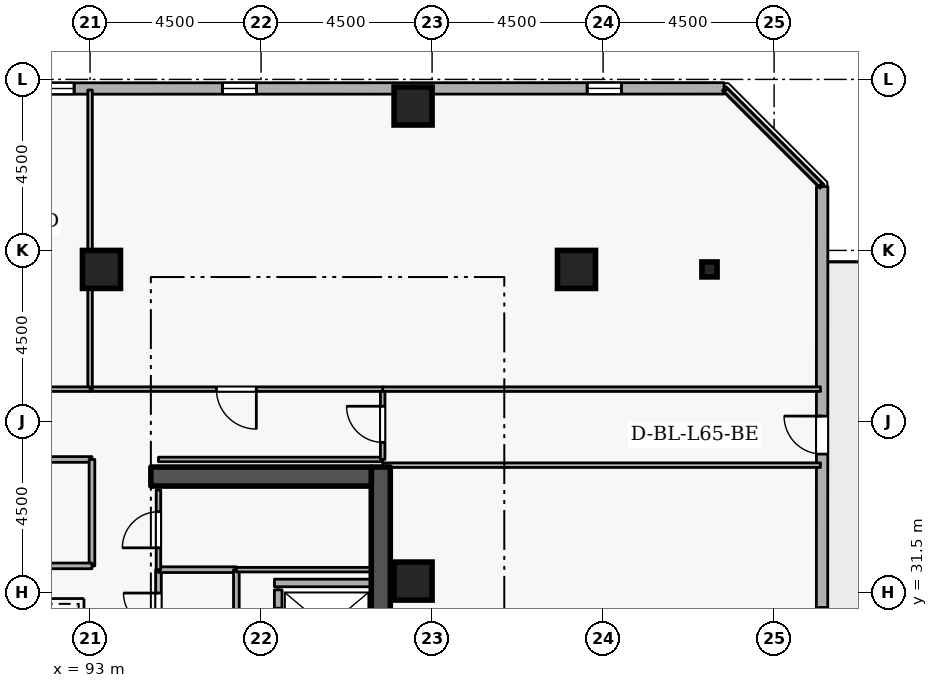
"""IFC4 building model, lengths in metres.
Left out: names, types, materials, properties, quantities, classifications, styles, units other than length and angle.
Written with IfcOpenShell. Run it as: python <this file> out.ifc"""

import sys

from ifc_helpers import new_model, si_unit, direction, frame, frame_2d, origin, origin_2d, place, context, subcontext, project, spatial, rectangle, i_section, extrude, element, fill, save


model = new_model("IFC4")
c1 = context("Model", 3, precision=1e-05, world=origin(), true_north=direction((0.0, 1.0)))
c2 = subcontext(c1, "Body", "Model", "MODEL_VIEW")
j1 = project(units=[si_unit("LENGTHUNIT", "METRE"), si_unit("PLANEANGLEUNIT", "RADIAN")], contexts=[c1])
p1 = place(None, origin())
s1 = spatial("IfcSite", under=j1, at=p1, CompositionType="ELEMENT")
p2 = place(p1, origin())
s2 = spatial("IfcBuilding", under=s1, at=p2, CompositionType="ELEMENT")
p3 = place(p2, frame((0.0, 0.0, 243.9)))
s3 = spatial("IfcBuildingStorey", under=s2, at=p3, CompositionType="ELEMENT", Elevation=243.9)
p4 = place(p3, frame((100.65, 19.2, 0.0), z_axis=(0.0, 0.0, 1.0), x_axis=(0.0, 1.0, 0.0)))
e1 = element("IfcWall", 1, at=p4, inside=s3, PredefinedType="SHEAR", context=c2, shape_type="SweptSolid", body=[
    extrude(rectangle(XDim=15.6, YDim=0.5, at=frame_2d((7.8, 0.0))), origin(), (0.0, 0.0, 1.0), 3.6),
])
p5 = place(p3, frame((94.6, 34.55, 0.0), z_axis=(0.0, 0.0, 1.0), x_axis=(1.0, 0.0, 0.0)))
e2 = element("IfcWall", 2, at=p5, inside=s3, PredefinedType="SHEAR", context=c2, shape_type="SweptSolid", body=[
    extrude(rectangle(XDim=5.8, YDim=0.5, at=frame_2d((2.9, 0.0))), origin(), (0.0, 0.0, 1.0), 3.6),
])
for number, where, z_axis, x_axis in (
    (3, (105.8, 40.0, 0.0), (0.0, 0.0, 1.0), (1.0, 0.0, 0.0)),
    (4, (101.5, 44.3, 0.0), (0.0, 0.0, 1.0), (1.0, 0.0, 0.0)),
    (5, (93.3, 40.0, 0.0), (0.0, 0.0, 1.0), (1.0, 0.0, 0.0)),
    (6, (101.5, 31.8, 0.0), (0.0, 0.0, 1.0), (1.0, 0.0, 0.0)),
):
    element("IfcColumn", number, at=place(p3, frame(where, z_axis=z_axis, x_axis=x_axis)), inside=s3, PredefinedType="COLUMN", context=c2, shape_type="SweptSolid", body=[
        extrude(rectangle(XDim=1.0, YDim=1.0, at=origin_2d()), origin(), (0.0, 0.0, 1.0), 3.6),
    ])
p6 = place(p3, frame((109.3, 40.0, 0.0), z_axis=(0.0, 0.0, 1.0), x_axis=(1.0, 0.0, 0.0)))
e7 = element("IfcColumn", 7, at=p6, inside=s3, PredefinedType="COLUMN", context=c2, shape_type="SweptSolid", body=[
    extrude(i_section(OverallWidth=0.399, OverallDepth=0.394, WebThickness=0.023, FlangeThickness=0.037, FilletRadius=0.015, at=origin_2d()), origin(), (0.0, 0.0, 1.0), 3.6),
])
p7 = place(p3, frame((112.256, 8.301, 0.0), z_axis=(0.0, 0.0, 1.0), x_axis=(0.000244999128, 0.999999969988, 0.0)))
e8 = element("IfcWall", 8, at=p7, inside=s3, PredefinedType="STANDARD", context=c2, shape_type="SweptSolid", body=[
    extrude(rectangle(XDim=33.881, YDim=0.3, at=frame_2d((16.94, 0.0))), origin(), (0.0, 0.0, 1.0), 2.7),
])
p8 = place(p7, frame((26.84, 0.0, 0.0)))
e9 = element("IfcOpeningElement", 9, at=p8, cuts=e8, PredefinedType="OPENING", context=c2, shape_type="SweptSolid", body=[
    extrude(rectangle(XDim=1.0, YDim=2.08, at=frame_2d((0.5, 1.04))), frame((0.0, 0.16, 0.0), z_axis=(0.0, -1.0, 0.0), x_axis=(1.0, 0.0, 0.0)), (0.0, 0.0, 1.0), 0.32),
])
p9 = place(p7, frame((2.7, 0.0, 0.72)))
e10 = element("IfcOpeningElement", 10, at=p9, cuts=e8, PredefinedType="OPENING", context=c2, shape_type="SweptSolid", body=[
    extrude(rectangle(XDim=0.9, YDim=1.75, at=frame_2d((0.45, 0.875))), frame((0.0, 0.16, 0.0), z_axis=(0.0, -1.0, 0.0), x_axis=(1.0, 0.0, 0.0)), (0.0, 0.0, 1.0), 0.32),
])
p10 = place(p7, frame((12.3, 0.0, 0.72)))
e11 = element("IfcOpeningElement", 11, at=p10, cuts=e8, PredefinedType="OPENING", context=c2, shape_type="SweptSolid", body=[
    extrude(rectangle(XDim=0.9, YDim=1.75, at=frame_2d((0.45, 0.875))), frame((0.0, 0.16, 0.0), z_axis=(0.0, -1.0, 0.0), x_axis=(1.0, 0.0, 0.0)), (0.0, 0.0, 1.0), 0.32),
])
p11 = place(p7, frame((17.1, 0.0, 0.72)))
e12 = element("IfcOpeningElement", 12, at=p11, cuts=e8, PredefinedType="OPENING", context=c2, shape_type="SweptSolid", body=[
    extrude(rectangle(XDim=0.9, YDim=1.75, at=frame_2d((0.45, 0.875))), frame((0.0, 0.16, 0.0), z_axis=(0.0, -1.0, 0.0), x_axis=(1.0, 0.0, 0.0)), (0.0, 0.0, 1.0), 0.32),
])
p12 = place(p7, frame((21.9, 0.0, 0.72)))
e13 = element("IfcOpeningElement", 13, at=p12, cuts=e8, PredefinedType="OPENING", context=c2, shape_type="SweptSolid", body=[
    extrude(rectangle(XDim=0.9, YDim=1.75, at=frame_2d((0.45, 0.875))), frame((0.0, 0.16, 0.0), z_axis=(0.0, -1.0, 0.0), x_axis=(1.0, 0.0, 0.0)), (0.0, 0.0, 1.0), 0.32),
])
p13 = place(p3, frame((109.681, 44.765, 0.0), z_axis=(0.0, 0.0, 1.0), x_axis=(-0.999999969988, -0.000244999128, 0.0)))
e14 = element("IfcWall", 14, at=p13, inside=s3, PredefinedType="STANDARD", context=c2, shape_type="SweptSolid", body=[
    extrude(rectangle(XDim=33.881, YDim=0.3, at=frame_2d((16.94, 0.0))), origin(), (0.0, 0.0, 1.0), 2.7),
])
p14 = place(p13, frame((2.7, 0.0, 0.72)))
e15 = element("IfcOpeningElement", 15, at=p14, cuts=e14, PredefinedType="OPENING", context=c2, shape_type="SweptSolid", body=[
    extrude(rectangle(XDim=0.9, YDim=1.75, at=frame_2d((0.45, 0.875))), frame((0.0, 0.16, 0.0), z_axis=(0.0, -1.0, 0.0), x_axis=(1.0, 0.0, 0.0)), (0.0, 0.0, 1.0), 0.32),
])
p15 = place(p13, frame((12.3, 0.0, 0.72)))
e16 = element("IfcOpeningElement", 16, at=p15, cuts=e14, PredefinedType="OPENING", context=c2, shape_type="SweptSolid", body=[
    extrude(rectangle(XDim=0.9, YDim=1.75, at=frame_2d((0.45, 0.875))), frame((0.0, 0.16, 0.0), z_axis=(0.0, -1.0, 0.0), x_axis=(1.0, 0.0, 0.0)), (0.0, 0.0, 1.0), 0.32),
])
p16 = place(p13, frame((17.1, 0.0, 0.72)))
e17 = element("IfcOpeningElement", 17, at=p16, cuts=e14, PredefinedType="OPENING", context=c2, shape_type="SweptSolid", body=[
    extrude(rectangle(XDim=0.9, YDim=1.75, at=frame_2d((0.45, 0.875))), frame((0.0, 0.16, 0.0), z_axis=(0.0, -1.0, 0.0), x_axis=(1.0, 0.0, 0.0)), (0.0, 0.0, 1.0), 0.32),
])
p17 = place(p13, frame((26.7, 0.0, 0.72)))
e18 = element("IfcOpeningElement", 18, at=p17, cuts=e14, PredefinedType="OPENING", context=c2, shape_type="SweptSolid", body=[
    extrude(rectangle(XDim=0.9, YDim=1.75, at=frame_2d((0.45, 0.875))), frame((0.0, 0.16, 0.0), z_axis=(0.0, -1.0, 0.0), x_axis=(1.0, 0.0, 0.0)), (0.0, 0.0, 1.0), 0.32),
])
p18 = place(p3, frame((97.95, 31.57, 0.0), z_axis=(0.0, 0.0, 1.0), x_axis=(0.0, -1.0, 0.0)))
e19 = element("IfcWall", 19, at=p18, inside=s3, PredefinedType="STANDARD", context=c2, shape_type="SweptSolid", body=[
    extrude(rectangle(XDim=1.99, YDim=0.2, at=frame_2d((0.995, 0.0))), origin(), (0.0, 0.0, 1.0), 3.34),
])
p19 = place(p18, frame((0.485, 0.0, 0.0)))
e20 = element("IfcOpeningElement", 20, at=p19, cuts=e19, PredefinedType="OPENING", context=c2, shape_type="SweptSolid", body=[
    extrude(rectangle(XDim=1.02, YDim=2.06, at=frame_2d((0.51, 1.03))), frame((0.0, 0.11, 0.0), z_axis=(0.0, -1.0, 0.0), x_axis=(1.0, 0.0, 0.0)), (0.0, 0.0, 1.0), 0.22),
])
p20 = place(p3, frame((97.852, 31.75, 0.0), z_axis=(0.0, 0.0, 1.0), x_axis=(1.0, 0.0, 0.0)))
e21 = element("IfcWall", 21, at=p20, inside=s3, PredefinedType="STANDARD", context=c2, shape_type="SweptSolid", body=[
    extrude(rectangle(XDim=2.536, YDim=0.2, at=frame_2d((1.268, 0.0))), origin(), (0.0, 0.0, 1.0), 3.34),
])
p21 = place(p3, frame((94.8, 29.95, 0.0), z_axis=(0.0, 0.0, 1.0), x_axis=(0.0, 1.0, 0.0)))
e22 = element("IfcWall", 22, at=p21, inside=s3, PredefinedType="PARTITIONING", context=c2, shape_type="SweptSolid", body=[
    extrude(rectangle(XDim=2.15, YDim=0.15, at=frame_2d((1.075, 0.0))), origin(), (0.0, 0.0, 1.0), 3.34),
])
p22 = place(p21, frame((0.615, 0.0, 0.0)))
e23 = element("IfcOpeningElement", 23, at=p22, cuts=e22, PredefinedType="OPENING", context=c2, shape_type="SweptSolid", body=[
    extrude(rectangle(XDim=0.92, YDim=2.08, at=frame_2d((0.46, 1.04))), frame((0.0, 0.085, 0.0), z_axis=(0.0, -1.0, 0.0), x_axis=(1.0, 0.0, 0.0)), (0.0, 0.0, 1.0), 0.17),
])
p23 = place(p3, frame((94.8, 32.1, 0.0), z_axis=(0.0, 0.0, 1.0), x_axis=(1.0, 0.0, 0.0)))
e24 = element("IfcWall", 24, at=p23, inside=s3, PredefinedType="PARTITIONING", context=c2, shape_type="SweptSolid", body=[
    extrude(rectangle(XDim=2.05, YDim=0.15, at=frame_2d((1.025, 0.0))), origin(), (0.0, 0.0, 1.0), 3.34),
])
p24 = place(p3, frame((96.85, 32.1, 0.0), z_axis=(0.0, 0.0, 1.0), x_axis=(0.0, -1.0, 0.0)))
e25 = element("IfcWall", 25, at=p24, inside=s3, PredefinedType="PARTITIONING", context=c2, shape_type="SweptSolid", body=[
    extrude(rectangle(XDim=2.15, YDim=0.15, at=frame_2d((1.075, 0.0))), origin(), (0.0, 0.0, 1.0), 3.34),
])
p25 = place(p3, frame((94.8, 32.1, 0.0), z_axis=(0.0, 0.0, 1.0), x_axis=(0.0, 1.0, 0.0)))
e26 = element("IfcWall", 26, at=p25, inside=s3, PredefinedType="PARTITIONING", context=c2, shape_type="SweptSolid", body=[
    extrude(rectangle(XDim=2.1, YDim=0.12, at=frame_2d((1.05, 0.0))), origin(), (0.0, 0.0, 1.0), 3.34),
])
p26 = place(p25, frame((0.575, 0.0, 0.0)))
e27 = element("IfcOpeningElement", 27, at=p26, cuts=e26, PredefinedType="OPENING", context=c2, shape_type="SweptSolid", body=[
    extrude(rectangle(XDim=0.95, YDim=2.1, at=frame_2d((0.475, 1.05))), frame((0.0, 0.07, 0.0), z_axis=(0.0, -1.0, 0.0), x_axis=(1.0, 0.0, 0.0)), (0.0, 0.0, 1.0), 0.14),
])
p27 = place(p3, frame((100.4, 32.1, 0.0), z_axis=(0.0, 0.0, 1.0), x_axis=(-1.0, 0.0, 0.0)))
e28 = element("IfcWall", 28, at=p27, inside=s3, PredefinedType="PARTITIONING", context=c2, shape_type="SweptSolid", body=[
    extrude(rectangle(XDim=3.55, YDim=0.12, at=frame_2d((1.775, 0.0))), origin(), (0.0, 0.0, 1.0), 3.34),
])
p28 = place(p3, frame((94.8, 35.0, 0.0), z_axis=(0.0, 0.0, 1.0), x_axis=(1.0, 0.0, 0.0)))
e29 = element("IfcWall", 29, at=p28, inside=s3, PredefinedType="PARTITIONING", context=c2, shape_type="SweptSolid", body=[
    extrude(rectangle(XDim=5.9, YDim=0.12, at=frame_2d((2.95, 0.0))), origin(), (0.0, 0.0, 1.0), 3.34),
])
p29 = place(p3, frame((100.7, 35.0, 0.0), z_axis=(0.0, 0.0, 1.0), x_axis=(0.0, 1.0, 0.0)))
e30 = element("IfcWall", 30, at=p29, inside=s3, PredefinedType="PARTITIONING", context=c2, shape_type="SweptSolid", body=[
    extrude(rectangle(XDim=1.85, YDim=0.12, at=frame_2d((0.925, 0.0))), origin(), (0.0, 0.0, 1.0), 3.34),
])
p30 = place(p29, frame((0.45, 0.0, 0.0)))
e31 = element("IfcOpeningElement", 31, at=p30, cuts=e30, PredefinedType="OPENING", context=c2, shape_type="SweptSolid", body=[
    extrude(rectangle(XDim=0.95, YDim=2.1, at=frame_2d((0.475, 1.05))), frame((0.0, 0.07, 0.0), z_axis=(0.0, -1.0, 0.0), x_axis=(1.0, 0.0, 0.0)), (0.0, 0.0, 1.0), 0.14),
])
for number, where, z_axis, x_axis in (
    (32, (100.7, 36.85, 0.0), (0.0, 0.0, 1.0), (1.0, 0.0, 0.0)),
    (33, (112.22, 34.85, 0.0), (0.0, 0.0, 1.0), (-1.0, 0.0, 0.0)),
):
    element("IfcWall", number, at=place(p3, frame(where, z_axis=z_axis, x_axis=x_axis)), inside=s3, PredefinedType="PARTITIONING", context=c2, shape_type="SweptSolid", body=[
        extrude(rectangle(XDim=11.52, YDim=0.12, at=frame_2d((5.76, 0.0))), origin(), (0.0, 0.0, 1.0), 3.34),
    ])
p31 = place(p3, frame((100.7, 36.85, 0.0), z_axis=(0.0, 0.0, 1.0), x_axis=(-1.0, 0.0, 0.0)))
e34 = element("IfcWall", 34, at=p31, inside=s3, PredefinedType="PARTITIONING", context=c2, shape_type="SweptSolid", body=[
    extrude(rectangle(XDim=7.7, YDim=0.12, at=frame_2d((3.85, 0.0))), origin(), (0.0, 0.0, 1.0), 3.34),
])
p32 = place(p31, frame((3.325, 0.0, 0.0)))
e35 = element("IfcOpeningElement", 35, at=p32, cuts=e34, PredefinedType="OPENING", context=c2, shape_type="SweptSolid", body=[
    extrude(rectangle(XDim=1.05, YDim=2.1, at=frame_2d((0.525, 1.05))), frame((0.0, 0.07, 0.0), z_axis=(0.0, -1.0, 0.0), x_axis=(1.0, 0.0, 0.0)), (0.0, 0.0, 1.0), 0.14),
])
p33 = place(p3, frame((93.0, 36.85, 0.0), z_axis=(0.0, 0.0, 1.0), x_axis=(0.0, 1.0, 0.0)))
e36 = element("IfcWall", 36, at=p33, inside=s3, PredefinedType="PARTITIONING", context=c2, shape_type="SweptSolid", body=[
    extrude(rectangle(XDim=7.87, YDim=0.12, at=frame_2d((3.935, 0.0))), origin(), (0.0, 0.0, 1.0), 3.34),
])
p34 = place(p3, frame((109.725, 44.72, 0.0), z_axis=(0.0, 0.0, 1.0), x_axis=(0.707106781187, -0.707106781187, 0.0)))
e37 = element("IfcWall", 37, at=p34, inside=s3, PredefinedType="PARTITIONING", context=c2, shape_type="SweptSolid", body=[
    extrude(rectangle(XDim=3.528, YDim=0.12, at=frame_2d((1.764, 0.0))), origin(), (0.0, 0.0, 1.0), 3.34),
])
p35 = place(p3, frame((93.0, 36.85, 0.0), z_axis=(0.0, 0.0, 1.0), x_axis=(-1.0, 0.0, 0.0)))
e38 = element("IfcWall", 38, at=p35, inside=s3, PredefinedType="PARTITIONING", context=c2, shape_type="SweptSolid", body=[
    extrude(rectangle(XDim=6.3, YDim=0.12, at=frame_2d((3.15, 0.0))), origin(), (0.0, 0.0, 1.0), 3.34),
])
p36 = place(p35, frame((2.675, 0.0, 0.0)))
e39 = element("IfcOpeningElement", 39, at=p36, cuts=e38, PredefinedType="OPENING", context=c2, shape_type="SweptSolid", body=[
    extrude(rectangle(XDim=0.95, YDim=2.1, at=frame_2d((0.475, 1.05))), frame((0.0, 0.07, 0.0), z_axis=(0.0, -1.0, 0.0), x_axis=(1.0, 0.0, 0.0)), (0.0, 0.0, 1.0), 0.14),
])
p37 = place(p3, frame((88.5, 35.0, 0.0), z_axis=(0.0, 0.0, 1.0), x_axis=(1.0, 0.0, 0.0)))
e40 = element("IfcWall", 40, at=p37, inside=s3, PredefinedType="PARTITIONING", context=c2, shape_type="SweptSolid", body=[
    extrude(rectangle(XDim=4.55, YDim=0.15, at=frame_2d((2.275, 0.0))), origin(), (0.0, 0.0, 1.0), 3.34),
])
p38 = place(p37, frame((1.625, 0.0, 0.0)))
e41 = element("IfcOpeningElement", 41, at=p38, cuts=e40, PredefinedType="OPENING", context=c2, shape_type="SweptSolid", body=[
    extrude(rectangle(XDim=1.3, YDim=2.12, at=frame_2d((0.65, 1.06))), frame((0.0, 0.085, 0.0), z_axis=(0.0, -1.0, 0.0), x_axis=(1.0, 0.0, 0.0)), (0.0, 0.0, 1.0), 0.17),
])
p39 = place(p3, frame((93.05, 35.0, 0.0), z_axis=(0.0, 0.0, 1.0), x_axis=(0.0, -1.0, 0.0)))
e42 = element("IfcWall", 42, at=p39, inside=s3, PredefinedType="PARTITIONING", context=c2, shape_type="SweptSolid", body=[
    extrude(rectangle(XDim=2.8, YDim=0.15, at=frame_2d((1.4, 0.0))), origin(), (0.0, 0.0, 1.0), 3.34),
])
p40 = place(p3, frame((93.05, 32.2, 0.0), z_axis=(0.0, 0.0, 1.0), x_axis=(-1.0, 0.0, 0.0)))
e43 = element("IfcWall", 43, at=p40, inside=s3, PredefinedType="PARTITIONING", context=c2, shape_type="SweptSolid", body=[
    extrude(rectangle(XDim=4.55, YDim=0.15, at=frame_2d((2.275, 0.0))), origin(), (0.0, 0.0, 1.0), 3.34),
])
p41 = place(p8, origin())
e44 = element("IfcDoor", 44, at=p41, inside=s3, OperationType="SINGLE_SWING_RIGHT", PredefinedType="DOOR", context=c2, shape_type="SweptSolid", body=[
    extrude(rectangle(XDim=1.0, YDim=2.08, at=frame_2d((0.5, 1.04))), frame((0.0, 0.025, 0.0), z_axis=(0.0, -1.0, 0.0), x_axis=(1.0, 0.0, 0.0)), (0.0, 0.0, 1.0), 0.05),
])
fill(e9, e44)
p42 = place(p12, origin())
e45 = element("IfcWindow", 45, at=p42, inside=s3, PartitioningType="SINGLE_PANEL", PredefinedType="WINDOW", context=c2, shape_type="SweptSolid", body=[
    extrude(rectangle(XDim=0.9, YDim=1.75, at=frame_2d((0.45, 0.875))), frame((0.0, 0.03, 0.0), z_axis=(0.0, -1.0, 0.0), x_axis=(1.0, 0.0, 0.0)), (0.0, 0.0, 1.0), 0.06),
])
fill(e13, e45)
p43 = place(p14, origin())
e46 = element("IfcWindow", 46, at=p43, inside=s3, PartitioningType="SINGLE_PANEL", PredefinedType="WINDOW", context=c2, shape_type="SweptSolid", body=[
    extrude(rectangle(XDim=0.9, YDim=1.75, at=frame_2d((0.45, 0.875))), frame((0.0, 0.03, 0.0), z_axis=(0.0, -1.0, 0.0), x_axis=(1.0, 0.0, 0.0)), (0.0, 0.0, 1.0), 0.06),
])
fill(e15, e46)
p44 = place(p15, origin())
e47 = element("IfcWindow", 47, at=p44, inside=s3, PartitioningType="SINGLE_PANEL", PredefinedType="WINDOW", context=c2, shape_type="SweptSolid", body=[
    extrude(rectangle(XDim=0.9, YDim=1.75, at=frame_2d((0.45, 0.875))), frame((0.0, 0.03, 0.0), z_axis=(0.0, -1.0, 0.0), x_axis=(1.0, 0.0, 0.0)), (0.0, 0.0, 1.0), 0.06),
])
fill(e16, e47)
p45 = place(p16, origin())
e48 = element("IfcWindow", 48, at=p45, inside=s3, PartitioningType="SINGLE_PANEL", PredefinedType="WINDOW", context=c2, shape_type="SweptSolid", body=[
    extrude(rectangle(XDim=0.9, YDim=1.75, at=frame_2d((0.45, 0.875))), frame((0.0, 0.03, 0.0), z_axis=(0.0, -1.0, 0.0), x_axis=(1.0, 0.0, 0.0)), (0.0, 0.0, 1.0), 0.06),
])
fill(e17, e48)
p46 = place(p22, origin())
e49 = element("IfcDoor", 49, at=p46, inside=s3, OperationType="SINGLE_SWING_RIGHT", PredefinedType="DOOR", context=c2, shape_type="SweptSolid", body=[
    extrude(rectangle(XDim=0.92, YDim=2.08, at=frame_2d((0.46, 1.04))), frame((0.0, 0.025, 0.0), z_axis=(0.0, -1.0, 0.0), x_axis=(1.0, 0.0, 0.0)), (0.0, 0.0, 1.0), 0.05),
])
fill(e23, e49)
p47 = place(p26, origin())
e50 = element("IfcDoor", 50, at=p47, inside=s3, OperationType="SINGLE_SWING_LEFT", PredefinedType="DOOR", context=c2, shape_type="SweptSolid", body=[
    extrude(rectangle(XDim=0.95, YDim=2.1, at=frame_2d((0.475, 1.05))), frame((0.0, 0.025, 0.0), z_axis=(0.0, -1.0, 0.0), x_axis=(1.0, 0.0, 0.0)), (0.0, 0.0, 1.0), 0.05),
])
fill(e27, e50)
p48 = place(p30, origin())
e51 = element("IfcDoor", 51, at=p48, inside=s3, OperationType="SINGLE_SWING_RIGHT", PredefinedType="DOOR", context=c2, shape_type="SweptSolid", body=[
    extrude(rectangle(XDim=0.95, YDim=2.1, at=frame_2d((0.475, 1.05))), frame((0.0, 0.025, 0.0), z_axis=(0.0, -1.0, 0.0), x_axis=(1.0, 0.0, 0.0)), (0.0, 0.0, 1.0), 0.05),
])
fill(e31, e51)
p49 = place(p32, origin())
e52 = element("IfcDoor", 52, at=p49, inside=s3, OperationType="SINGLE_SWING_LEFT", PredefinedType="DOOR", context=c2, shape_type="SweptSolid", body=[
    extrude(rectangle(XDim=1.05, YDim=2.1, at=frame_2d((0.525, 1.05))), frame((0.0, 0.025, 0.0), z_axis=(0.0, -1.0, 0.0), x_axis=(1.0, 0.0, 0.0)), (0.0, 0.0, 1.0), 0.05),
])
fill(e35, e52)
save(model, sys.argv[1])
